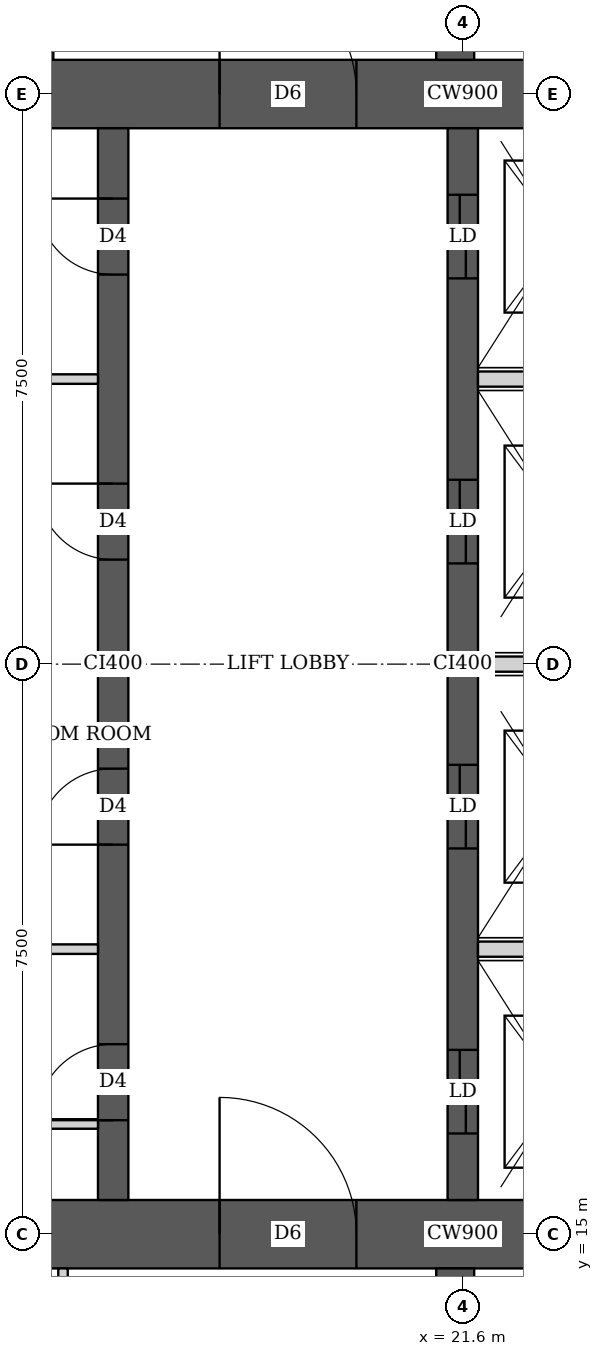
"""IFC4 building model, lengths in metres.
Left out: names, types, materials, properties, quantities, classifications, styles, units other than length and angle.
Written with IfcOpenShell. Run it as: python <this file> out.ifc"""

import sys

from ifc_helpers import new_model, si_unit, direction, frame, frame_2d, origin, place, context, subcontext, project, spatial, rectangle, extrude, element, fill, save


model = new_model("IFC4")
c1 = context("Model", 3, precision=1e-05, world=origin(), true_north=direction((0.0, 1.0)))
c2 = subcontext(c1, "Body", "Model", "MODEL_VIEW")
j1 = project(units=[si_unit("LENGTHUNIT", "METRE"), si_unit("PLANEANGLEUNIT", "RADIAN")], contexts=[c1])
p1 = place(None, origin())
s1 = spatial("IfcSite", under=j1, at=p1, CompositionType="ELEMENT")
p2 = place(p1, origin())
s2 = spatial("IfcBuilding", under=s1, at=p2, CompositionType="ELEMENT")
p3 = place(p2, frame((0.0, 0.0, 289.1)))
s3 = spatial("IfcBuildingStorey", under=s2, at=p3, CompositionType="ELEMENT", Elevation=289.1)
p4 = place(p3, frame((13.95, 15.0, 0.0), z_axis=(0.0, 0.0, 1.0), x_axis=(1.0, 0.0, 0.0)))
e1 = element("IfcWall", 1, at=p4, inside=s3, PredefinedType="SHEAR", context=c2, shape_type="SweptSolid", body=[
    extrude(rectangle(XDim=15.3, YDim=0.9, at=frame_2d((7.65, 0.0))), origin(), (0.0, 0.0, 1.0), 3.75),
])
p5 = place(p4, frame((4.45, 0.0, 0.0)))
e2 = element("IfcOpeningElement", 2, at=p5, cuts=e1, PredefinedType="OPENING", context=c2, shape_type="SweptSolid", body=[
    extrude(rectangle(XDim=1.8, YDim=2.1, at=frame_2d((0.9, 1.05))), frame((0.0, 0.46, 0.0), z_axis=(0.0, -1.0, 0.0), x_axis=(1.0, 0.0, 0.0)), (0.0, 0.0, 1.0), 0.92),
])
p6 = place(p4, frame((10.7, 0.0, 0.0)))
e3 = element("IfcOpeningElement", 3, at=p6, cuts=e1, PredefinedType="OPENING", context=c2, shape_type="SweptSolid", body=[
    extrude(rectangle(XDim=1.1, YDim=2.1, at=frame_2d((0.55, 1.05))), frame((0.0, 0.46, 0.0), z_axis=(0.0, -1.0, 0.0), x_axis=(1.0, 0.0, 0.0)), (0.0, 0.0, 1.0), 0.92),
])
p7 = place(p3, frame((13.95, 30.0, 0.0), z_axis=(0.0, 0.0, 1.0), x_axis=(1.0, 0.0, 0.0)))
e4 = element("IfcWall", 4, at=p7, inside=s3, PredefinedType="SHEAR", context=c2, shape_type="SweptSolid", body=[
    extrude(rectangle(XDim=15.3, YDim=0.9, at=frame_2d((7.65, 0.0))), origin(), (0.0, 0.0, 1.0), 3.75),
])
p8 = place(p7, frame((4.45, 0.0, 0.0)))
e5 = element("IfcOpeningElement", 5, at=p8, cuts=e4, PredefinedType="OPENING", context=c2, shape_type="SweptSolid", body=[
    extrude(rectangle(XDim=1.8, YDim=2.1, at=frame_2d((0.9, 1.05))), frame((0.0, 0.46, 0.0), z_axis=(0.0, -1.0, 0.0), x_axis=(1.0, 0.0, 0.0)), (0.0, 0.0, 1.0), 0.92),
])
p9 = place(p7, frame((10.7, 0.0, 0.0)))
e6 = element("IfcOpeningElement", 6, at=p9, cuts=e4, PredefinedType="OPENING", context=c2, shape_type="SweptSolid", body=[
    extrude(rectangle(XDim=1.1, YDim=2.1, at=frame_2d((0.55, 1.05))), frame((0.0, 0.46, 0.0), z_axis=(0.0, -1.0, 0.0), x_axis=(1.0, 0.0, 0.0)), (0.0, 0.0, 1.0), 0.92),
])
p10 = place(p3, frame((17.0, 15.45, 0.0), z_axis=(0.0, 0.0, 1.0), x_axis=(0.0, 1.0, 0.0)))
e7 = element("IfcWall", 7, at=p10, inside=s3, PredefinedType="SHEAR", context=c2, shape_type="SweptSolid", body=[
    extrude(rectangle(XDim=14.1, YDim=0.4, at=frame_2d((7.05, 0.0))), origin(), (0.0, 0.0, 1.0), 3.75),
])
p11 = place(p10, frame((1.05, 0.0, 0.0)))
e8 = element("IfcOpeningElement", 8, at=p11, cuts=e7, PredefinedType="OPENING", context=c2, shape_type="SweptSolid", body=[
    extrude(rectangle(XDim=1.0, YDim=2.1, at=frame_2d((0.5, 1.05))), frame((0.0, 0.21, 0.0), z_axis=(0.0, -1.0, 0.0), x_axis=(1.0, 0.0, 0.0)), (0.0, 0.0, 1.0), 0.42),
])
p12 = place(p10, frame((4.675, 0.0, 0.0)))
e9 = element("IfcOpeningElement", 9, at=p12, cuts=e7, PredefinedType="OPENING", context=c2, shape_type="SweptSolid", body=[
    extrude(rectangle(XDim=1.0, YDim=2.1, at=frame_2d((0.5, 1.05))), frame((0.0, 0.21, 0.0), z_axis=(0.0, -1.0, 0.0), x_axis=(1.0, 0.0, 0.0)), (0.0, 0.0, 1.0), 0.42),
])
p13 = place(p10, frame((8.425, 0.0, 0.0)))
e10 = element("IfcOpeningElement", 10, at=p13, cuts=e7, PredefinedType="OPENING", context=c2, shape_type="SweptSolid", body=[
    extrude(rectangle(XDim=1.0, YDim=2.1, at=frame_2d((0.5, 1.05))), frame((0.0, 0.21, 0.0), z_axis=(0.0, -1.0, 0.0), x_axis=(1.0, 0.0, 0.0)), (0.0, 0.0, 1.0), 0.42),
])
p14 = place(p10, frame((12.175, 0.0, 0.0)))
e11 = element("IfcOpeningElement", 11, at=p14, cuts=e7, PredefinedType="OPENING", context=c2, shape_type="SweptSolid", body=[
    extrude(rectangle(XDim=1.0, YDim=2.1, at=frame_2d((0.5, 1.05))), frame((0.0, 0.21, 0.0), z_axis=(0.0, -1.0, 0.0), x_axis=(1.0, 0.0, 0.0)), (0.0, 0.0, 1.0), 0.42),
])
p15 = place(p3, frame((21.6, 15.45, 0.0), z_axis=(0.0, 0.0, 1.0), x_axis=(0.0, 1.0, 0.0)))
e12 = element("IfcWall", 12, at=p15, inside=s3, PredefinedType="SHEAR", context=c2, shape_type="SweptSolid", body=[
    extrude(rectangle(XDim=14.1, YDim=0.4, at=frame_2d((7.05, 0.0))), origin(), (0.0, 0.0, 1.0), 3.75),
])
p16 = place(p15, frame((0.875, 0.0, 0.0)))
e13 = element("IfcOpeningElement", 13, at=p16, cuts=e12, PredefinedType="OPENING", context=c2, shape_type="SweptSolid", body=[
    extrude(rectangle(XDim=1.1, YDim=2.1, at=frame_2d((0.55, 1.05))), frame((0.0, 0.21, 0.0), z_axis=(0.0, -1.0, 0.0), x_axis=(1.0, 0.0, 0.0)), (0.0, 0.0, 1.0), 0.42),
])
p17 = place(p15, frame((4.625, 0.0, 0.0)))
e14 = element("IfcOpeningElement", 14, at=p17, cuts=e12, PredefinedType="OPENING", context=c2, shape_type="SweptSolid", body=[
    extrude(rectangle(XDim=1.1, YDim=2.1, at=frame_2d((0.55, 1.05))), frame((0.0, 0.21, 0.0), z_axis=(0.0, -1.0, 0.0), x_axis=(1.0, 0.0, 0.0)), (0.0, 0.0, 1.0), 0.42),
])
p18 = place(p15, frame((8.375, 0.0, 0.0)))
e15 = element("IfcOpeningElement", 15, at=p18, cuts=e12, PredefinedType="OPENING", context=c2, shape_type="SweptSolid", body=[
    extrude(rectangle(XDim=1.1, YDim=2.1, at=frame_2d((0.55, 1.05))), frame((0.0, 0.21, 0.0), z_axis=(0.0, -1.0, 0.0), x_axis=(1.0, 0.0, 0.0)), (0.0, 0.0, 1.0), 0.42),
])
p19 = place(p15, frame((12.125, 0.0, 0.0)))
e16 = element("IfcOpeningElement", 16, at=p19, cuts=e12, PredefinedType="OPENING", context=c2, shape_type="SweptSolid", body=[
    extrude(rectangle(XDim=1.1, YDim=2.1, at=frame_2d((0.55, 1.05))), frame((0.0, 0.21, 0.0), z_axis=(0.0, -1.0, 0.0), x_axis=(1.0, 0.0, 0.0)), (0.0, 0.0, 1.0), 0.42),
])
for number, where, z_axis, x_axis in (
    (17, (21.5, 10.35, 0.0), (0.0, 0.0, 1.0), (0.0, 1.0, 0.0)),
    (18, (21.5, 30.45, 0.0), (0.0, 0.0, 1.0), (0.0, 1.0, 0.0)),
):
    element("IfcWall", number, at=place(p3, frame(where, z_axis=z_axis, x_axis=x_axis)), inside=s3, PredefinedType="SHEAR", context=c2, shape_type="SweptSolid", body=[
        extrude(rectangle(XDim=4.2, YDim=0.5, at=frame_2d((2.1, 0.0))), origin(), (0.0, 0.0, 1.0), 3.75),
    ])
p20 = place(p3, frame((16.34, 10.562, 0.0), z_axis=(0.0, 0.0, 1.0), x_axis=(0.0, 1.0, 0.0)))
e19 = element("IfcWall", 19, at=p20, inside=s3, PredefinedType="PARTITIONING", context=c2, shape_type="SweptSolid", body=[
    extrude(rectangle(XDim=3.988, YDim=0.125, at=frame_2d((1.994, 0.0))), origin(), (0.0, 0.0, 1.0), 3.5),
])
p21 = place(p20, frame((1.438, 0.0, 0.0)))
e20 = element("IfcOpeningElement", 20, at=p21, cuts=e19, PredefinedType="OPENING", context=c2, shape_type="SweptSolid", body=[
    extrude(rectangle(XDim=1.0, YDim=2.1, at=frame_2d((0.5, 1.05))), frame((0.0, 0.073, 0.0), z_axis=(0.0, -1.0, 0.0), x_axis=(1.0, 0.0, 0.0)), (0.0, 0.0, 1.0), 0.145),
])
p22 = place(p3, frame((16.15, 30.45, 0.0), z_axis=(0.0, 0.0, 1.0), x_axis=(0.0, 1.0, 0.0)))
e21 = element("IfcWall", 21, at=p22, inside=s3, PredefinedType="PARTITIONING", context=c2, shape_type="SweptSolid", body=[
    extrude(rectangle(XDim=4.387, YDim=0.125, at=frame_2d((2.193, 0.0))), origin(), (0.0, 0.0, 1.0), 3.5),
])
p23 = place(p22, frame((1.75, 0.0, 0.0)))
e22 = element("IfcOpeningElement", 22, at=p23, cuts=e21, PredefinedType="OPENING", context=c2, shape_type="SweptSolid", body=[
    extrude(rectangle(XDim=1.0, YDim=2.1, at=frame_2d((0.5, 1.05))), frame((0.0, 0.073, 0.0), z_axis=(0.0, -1.0, 0.0), x_axis=(1.0, 0.0, 0.0)), (0.0, 0.0, 1.0), 0.145),
])
p24 = place(p3, frame((14.85, 16.45, 0.0), z_axis=(0.0, 0.0, 1.0), x_axis=(1.0, 0.0, 0.0)))
e23 = element("IfcWall", 23, at=p24, inside=s3, PredefinedType="PARTITIONING", context=c2, shape_type="SweptSolid", body=[
    extrude(rectangle(XDim=1.95, YDim=0.125, at=frame_2d((0.975, 0.0))), origin(), (0.0, 0.0, 1.0), 3.5),
])
p25 = place(p24, frame((0.2, 0.0, 0.0)))
e24 = element("IfcOpeningElement", 24, at=p25, cuts=e23, PredefinedType="OPENING", context=c2, shape_type="SweptSolid", body=[
    extrude(rectangle(XDim=1.0, YDim=2.1, at=frame_2d((0.5, 1.05))), frame((0.0, 0.073, 0.0), z_axis=(0.0, -1.0, 0.0), x_axis=(1.0, 0.0, 0.0)), (0.0, 0.0, 1.0), 0.145),
])
for number, where, z_axis, x_axis in (
    (25, (14.85, 18.75, 0.0), (0.0, 0.0, 1.0), (1.0, 0.0, 0.0)),
    (26, (14.85, 26.25, 0.0), (0.0, 0.0, 1.0), (1.0, 0.0, 0.0)),
):
    element("IfcWall", number, at=place(p3, frame(where, z_axis=z_axis, x_axis=x_axis)), inside=s3, PredefinedType="PARTITIONING", context=c2, shape_type="SweptSolid", body=[
        extrude(rectangle(XDim=1.95, YDim=0.125, at=frame_2d((0.975, 0.0))), origin(), (0.0, 0.0, 1.0), 3.5),
    ])
for number, where, z_axis, x_axis in (
    (27, (21.8, 18.75, 0.0), (0.0, 0.0, 1.0), (1.0, 0.0, 0.0)),
    (28, (21.8, 22.5, 0.0), (0.0, 0.0, 1.0), (1.0, 0.0, 0.0)),
    (29, (21.8, 26.25, 0.0), (0.0, 0.0, 1.0), (1.0, 0.0, 0.0)),
):
    element("IfcWall", number, at=place(p3, frame(where, z_axis=z_axis, x_axis=x_axis)), inside=s3, PredefinedType="SOLIDWALL", context=c2, shape_type="SweptSolid", body=[
        extrude(rectangle(XDim=2.2, YDim=0.2, at=frame_2d((1.1, 0.0))), origin(), (0.0, 0.0, 1.0), 3.5),
    ])
p26 = place(p11, origin())
e30 = element("IfcDoor", 30, at=p26, inside=s3, OperationType="SINGLE_SWING_LEFT", PredefinedType="DOOR", context=c2, shape_type="SweptSolid", body=[
    extrude(rectangle(XDim=1.0, YDim=2.1, at=frame_2d((0.5, 1.05))), frame((0.0, 0.025, 0.0), z_axis=(0.0, -1.0, 0.0), x_axis=(1.0, 0.0, 0.0)), (0.0, 0.0, 1.0), 0.05),
])
fill(e8, e30)
p27 = place(p12, origin())
e31 = element("IfcDoor", 31, at=p27, inside=s3, OperationType="SINGLE_SWING_LEFT", PredefinedType="DOOR", context=c2, shape_type="SweptSolid", body=[
    extrude(rectangle(XDim=1.0, YDim=2.1, at=frame_2d((0.5, 1.05))), frame((0.0, 0.025, 0.0), z_axis=(0.0, -1.0, 0.0), x_axis=(1.0, 0.0, 0.0)), (0.0, 0.0, 1.0), 0.05),
])
fill(e9, e31)
p28 = place(p13, origin())
e32 = element("IfcDoor", 32, at=p28, inside=s3, OperationType="SINGLE_SWING_RIGHT", PredefinedType="DOOR", context=c2, shape_type="SweptSolid", body=[
    extrude(rectangle(XDim=1.0, YDim=2.1, at=frame_2d((0.5, 1.05))), frame((0.0, 0.025, 0.0), z_axis=(0.0, -1.0, 0.0), x_axis=(1.0, 0.0, 0.0)), (0.0, 0.0, 1.0), 0.05),
])
fill(e10, e32)
p29 = place(p14, origin())
e33 = element("IfcDoor", 33, at=p29, inside=s3, OperationType="SINGLE_SWING_RIGHT", PredefinedType="DOOR", context=c2, shape_type="SweptSolid", body=[
    extrude(rectangle(XDim=1.0, YDim=2.1, at=frame_2d((0.5, 1.05))), frame((0.0, 0.025, 0.0), z_axis=(0.0, -1.0, 0.0), x_axis=(1.0, 0.0, 0.0)), (0.0, 0.0, 1.0), 0.05),
])
fill(e11, e33)
p30 = place(p5, origin())
e34 = element("IfcDoor", 34, at=p30, inside=s3, OperationType="DOUBLE_DOOR_SINGLE_SWING", PredefinedType="DOOR", context=c2, shape_type="SweptSolid", body=[
    extrude(rectangle(XDim=1.8, YDim=2.1, at=frame_2d((0.9, 1.05))), frame((0.0, 0.025, 0.0), z_axis=(0.0, -1.0, 0.0), x_axis=(1.0, 0.0, 0.0)), (0.0, 0.0, 1.0), 0.05),
])
fill(e2, e34)
p31 = place(p8, origin())
e35 = element("IfcDoor", 35, at=p31, inside=s3, OperationType="DOUBLE_DOOR_SINGLE_SWING", PredefinedType="DOOR", context=c2, shape_type="SweptSolid", body=[
    extrude(rectangle(XDim=1.8, YDim=2.1, at=frame_2d((0.9, 1.05))), frame((0.0, 0.025, 0.0), z_axis=(0.0, -1.0, 0.0), x_axis=(1.0, 0.0, 0.0)), (0.0, 0.0, 1.0), 0.05),
])
fill(e5, e35)
p32 = place(p16, origin())
e36 = element("IfcDoor", 36, at=p32, inside=s3, OperationType="DOUBLE_DOOR_SLIDING", PredefinedType="DOOR", context=c2, shape_type="SweptSolid", body=[
    extrude(rectangle(XDim=1.1, YDim=2.1, at=frame_2d((0.55, 1.05))), frame((0.0, 0.025, 0.0), z_axis=(0.0, -1.0, 0.0), x_axis=(1.0, 0.0, 0.0)), (0.0, 0.0, 1.0), 0.05),
])
fill(e13, e36)
p33 = place(p17, origin())
e37 = element("IfcDoor", 37, at=p33, inside=s3, OperationType="DOUBLE_DOOR_SLIDING", PredefinedType="DOOR", context=c2, shape_type="SweptSolid", body=[
    extrude(rectangle(XDim=1.1, YDim=2.1, at=frame_2d((0.55, 1.05))), frame((0.0, 0.025, 0.0), z_axis=(0.0, -1.0, 0.0), x_axis=(1.0, 0.0, 0.0)), (0.0, 0.0, 1.0), 0.05),
])
fill(e14, e37)
p34 = place(p18, origin())
e38 = element("IfcDoor", 38, at=p34, inside=s3, OperationType="DOUBLE_DOOR_SLIDING", PredefinedType="DOOR", context=c2, shape_type="SweptSolid", body=[
    extrude(rectangle(XDim=1.1, YDim=2.1, at=frame_2d((0.55, 1.05))), frame((0.0, 0.025, 0.0), z_axis=(0.0, -1.0, 0.0), x_axis=(1.0, 0.0, 0.0)), (0.0, 0.0, 1.0), 0.05),
])
fill(e15, e38)
p35 = place(p19, origin())
e39 = element("IfcDoor", 39, at=p35, inside=s3, OperationType="DOUBLE_DOOR_SLIDING", PredefinedType="DOOR", context=c2, shape_type="SweptSolid", body=[
    extrude(rectangle(XDim=1.1, YDim=2.1, at=frame_2d((0.55, 1.05))), frame((0.0, 0.025, 0.0), z_axis=(0.0, -1.0, 0.0), x_axis=(1.0, 0.0, 0.0)), (0.0, 0.0, 1.0), 0.05),
])
fill(e16, e39)
save(model, sys.argv[1])
